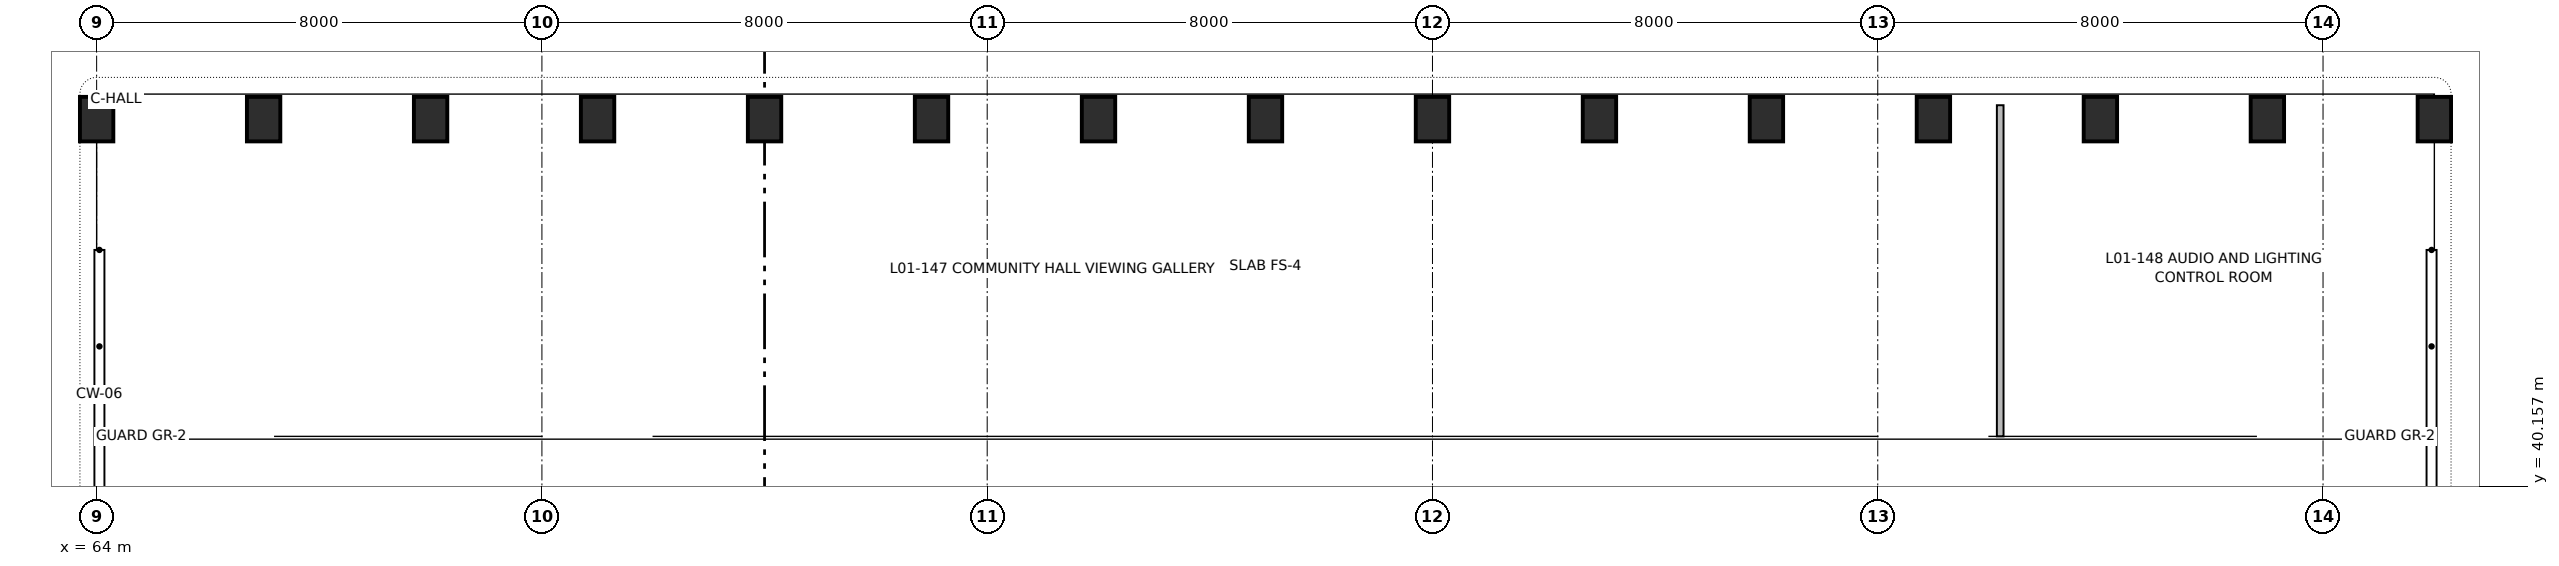
"""IFC4 building model, lengths in metres.
Left out: names, types, materials, properties, quantities, classifications, styles, units other than length and angle.
Written with IfcOpenShell. Run it as: python <this file> out.ifc"""

import sys

from ifc_helpers import new_model, si_unit, direction, frame, frame_2d, origin, origin_2d, place, context, subcontext, project, spatial, rectangle, extrude, element, save


model = new_model("IFC4")
c1 = context("Model", 3, precision=1e-05, world=origin(), true_north=direction((0.0, 1.0)))
c2 = subcontext(c1, "Body", "Model", "MODEL_VIEW")
j1 = project(units=[si_unit("LENGTHUNIT", "METRE"), si_unit("PLANEANGLEUNIT", "RADIAN")], contexts=[c1])
p1 = place(None, origin())
s1 = spatial("IfcSite", under=j1, at=p1, CompositionType="ELEMENT")
p2 = place(p1, origin())
s2 = spatial("IfcBuilding", under=s1, at=p2, CompositionType="ELEMENT")
p3 = place(p2, frame((0.0, 0.0, 4.16)))
s3 = spatial("IfcBuildingStorey", under=s2, at=p3, CompositionType="ELEMENT", Elevation=4.16)
p4 = place(p3, frame((64.0, 46.75, 0.0), z_axis=(0.0, 0.0, 1.0), x_axis=(1.0, 0.0, 0.0)))
e1 = element("IfcColumn", 1, at=p4, inside=s3, PredefinedType="COLUMN", context=c2, shape_type="SweptSolid", body=[
    extrude(rectangle(XDim=0.6, YDim=0.8, at=origin_2d()), origin(), (0.0, 0.0, 1.0), 2.89),
])
p5 = place(p3, frame((67.0, 46.75, 0.0), z_axis=(0.0, 0.0, 1.0), x_axis=(1.0, 0.0, 0.0)))
e2 = element("IfcColumn", 2, at=p5, inside=s3, PredefinedType="COLUMN", context=c2, shape_type="SweptSolid", body=[
    extrude(rectangle(XDim=0.6, YDim=0.8, at=origin_2d()), origin(), (0.0, 0.0, 1.0), 3.8),
])
p6 = place(p3, frame((70.0, 46.75, 0.0), z_axis=(0.0, 0.0, 1.0), x_axis=(1.0, 0.0, 0.0)))
e3 = element("IfcColumn", 3, at=p6, inside=s3, PredefinedType="COLUMN", context=c2, shape_type="SweptSolid", body=[
    extrude(rectangle(XDim=0.6, YDim=0.8, at=origin_2d()), origin(), (0.0, 0.0, 1.0), 2.89),
])
p7 = place(p3, frame((73.0, 46.75, 0.0), z_axis=(0.0, 0.0, 1.0), x_axis=(1.0, 0.0, 0.0)))
e4 = element("IfcColumn", 4, at=p7, inside=s3, PredefinedType="COLUMN", context=c2, shape_type="SweptSolid", body=[
    extrude(rectangle(XDim=0.6, YDim=0.8, at=origin_2d()), origin(), (0.0, 0.0, 1.0), 3.8),
])
p8 = place(p3, frame((76.0, 46.75, 0.0), z_axis=(0.0, 0.0, 1.0), x_axis=(1.0, 0.0, 0.0)))
e5 = element("IfcColumn", 5, at=p8, inside=s3, PredefinedType="COLUMN", context=c2, shape_type="SweptSolid", body=[
    extrude(rectangle(XDim=0.6, YDim=0.8, at=origin_2d()), origin(), (0.0, 0.0, 1.0), 2.89),
])
p9 = place(p3, frame((79.0, 46.75, 0.0), z_axis=(0.0, 0.0, 1.0), x_axis=(1.0, 0.0, 0.0)))
e6 = element("IfcColumn", 6, at=p9, inside=s3, PredefinedType="COLUMN", context=c2, shape_type="SweptSolid", body=[
    extrude(rectangle(XDim=0.6, YDim=0.8, at=origin_2d()), origin(), (0.0, 0.0, 1.0), 3.8),
])
p10 = place(p3, frame((82.0, 46.75, 0.0), z_axis=(0.0, 0.0, 1.0), x_axis=(1.0, 0.0, 0.0)))
e7 = element("IfcColumn", 7, at=p10, inside=s3, PredefinedType="COLUMN", context=c2, shape_type="SweptSolid", body=[
    extrude(rectangle(XDim=0.6, YDim=0.8, at=origin_2d()), origin(), (0.0, 0.0, 1.0), 2.89),
])
p11 = place(p3, frame((85.0, 46.75, 0.0), z_axis=(0.0, 0.0, 1.0), x_axis=(1.0, 0.0, 0.0)))
e8 = element("IfcColumn", 8, at=p11, inside=s3, PredefinedType="COLUMN", context=c2, shape_type="SweptSolid", body=[
    extrude(rectangle(XDim=0.6, YDim=0.8, at=origin_2d()), origin(), (0.0, 0.0, 1.0), 3.8),
])
p12 = place(p3, frame((88.0, 46.75, 0.0), z_axis=(0.0, 0.0, 1.0), x_axis=(1.0, 0.0, 0.0)))
e9 = element("IfcColumn", 9, at=p12, inside=s3, PredefinedType="COLUMN", context=c2, shape_type="SweptSolid", body=[
    extrude(rectangle(XDim=0.6, YDim=0.8, at=origin_2d()), origin(), (0.0, 0.0, 1.0), 2.89),
])
p13 = place(p3, frame((91.0, 46.75, 0.0), z_axis=(0.0, 0.0, 1.0), x_axis=(1.0, 0.0, 0.0)))
e10 = element("IfcColumn", 10, at=p13, inside=s3, PredefinedType="COLUMN", context=c2, shape_type="SweptSolid", body=[
    extrude(rectangle(XDim=0.6, YDim=0.8, at=origin_2d()), origin(), (0.0, 0.0, 1.0), 3.8),
])
p14 = place(p3, frame((94.0, 46.75, 0.0), z_axis=(0.0, 0.0, 1.0), x_axis=(1.0, 0.0, 0.0)))
e11 = element("IfcColumn", 11, at=p14, inside=s3, PredefinedType="COLUMN", context=c2, shape_type="SweptSolid", body=[
    extrude(rectangle(XDim=0.6, YDim=0.8, at=origin_2d()), origin(), (0.0, 0.0, 1.0), 2.89),
])
p15 = place(p3, frame((97.0, 46.75, 0.0), z_axis=(0.0, 0.0, 1.0), x_axis=(1.0, 0.0, 0.0)))
e12 = element("IfcColumn", 12, at=p15, inside=s3, PredefinedType="COLUMN", context=c2, shape_type="SweptSolid", body=[
    extrude(rectangle(XDim=0.6, YDim=0.8, at=origin_2d()), origin(), (0.0, 0.0, 1.0), 3.8),
])
p16 = place(p3, frame((100.0, 46.75, 0.0), z_axis=(0.0, 0.0, 1.0), x_axis=(1.0, 0.0, 0.0)))
e13 = element("IfcColumn", 13, at=p16, inside=s3, PredefinedType="COLUMN", context=c2, shape_type="SweptSolid", body=[
    extrude(rectangle(XDim=0.6, YDim=0.8, at=origin_2d()), origin(), (0.0, 0.0, 1.0), 2.89),
])
p17 = place(p3, frame((103.0, 46.75, 0.0), z_axis=(0.0, 0.0, 1.0), x_axis=(1.0, 0.0, 0.0)))
e14 = element("IfcColumn", 14, at=p17, inside=s3, PredefinedType="COLUMN", context=c2, shape_type="SweptSolid", body=[
    extrude(rectangle(XDim=0.6, YDim=0.8, at=origin_2d()), origin(), (0.0, 0.0, 1.0), 3.8),
])
p18 = place(p3, frame((106.0, 46.75, 0.0), z_axis=(0.0, 0.0, 1.0), x_axis=(1.0, 0.0, 0.0)))
e15 = element("IfcColumn", 15, at=p18, inside=s3, PredefinedType="COLUMN", context=c2, shape_type="SweptSolid", body=[
    extrude(rectangle(XDim=0.6, YDim=0.8, at=origin_2d()), origin(), (0.0, 0.0, 1.0), 2.89),
])
p19 = place(p2, origin())
s4 = spatial("IfcBuildingStorey", under=s2, at=p19, CompositionType="ELEMENT", Elevation=0.0)
p20 = place(p19, frame((64.0, 12.0, 0.0), z_axis=(0.0, 0.0, 1.0), x_axis=(0.0, 1.0, 0.0)))
e16 = element("IfcWall", 16, at=p20, inside=s4, PredefinedType="SHEAR", context=c2, shape_type="SweptSolid", body=[
    extrude(rectangle(XDim=35.2, YDim=0.36, at=frame_2d((17.6, 0.0))), origin(), (0.0, 0.0, 1.0), 6.84),
])
p21 = place(p20, frame((10.0, 0.0, 0.0)))
e17 = element("IfcOpeningElement", 17, at=p21, cuts=e16, PredefinedType="OPENING", context=c2, shape_type="SweptSolid", body=[
    extrude(rectangle(XDim=1.9, YDim=2.3, at=frame_2d((0.95, 1.15))), frame((0.0, 0.19, 0.0), z_axis=(0.0, -1.0, 0.0), x_axis=(1.0, 0.0, 0.0)), (0.0, 0.0, 1.0), 0.38),
])
p22 = place(p20, frame((24.0, 0.0, 0.0)))
e18 = element("IfcOpeningElement", 18, at=p22, cuts=e16, PredefinedType="OPENING", context=c2, shape_type="SweptSolid", body=[
    extrude(rectangle(XDim=1.9, YDim=2.3, at=frame_2d((0.95, 1.15))), frame((0.0, 0.19, 0.0), z_axis=(0.0, -1.0, 0.0), x_axis=(1.0, 0.0, 0.0)), (0.0, 0.0, 1.0), 0.38),
])
p23 = place(p20, frame((30.5, 0.0, 1.1)))
e19 = element("IfcOpeningElement", 19, at=p23, cuts=e16, PredefinedType="OPENING", context=c2, shape_type="SweptSolid", body=[
    extrude(rectangle(XDim=2.2, YDim=1.9, at=frame_2d((1.1, 0.95))), frame((0.0, 0.19, 0.0), z_axis=(0.0, -1.0, 0.0), x_axis=(1.0, 0.0, 0.0)), (0.0, 0.0, 1.0), 0.38),
])
p24 = place(p19, frame((64.0, 47.2, 0.0), z_axis=(0.0, 0.0, 1.0), x_axis=(1.0, 0.0, 0.0)))
e20 = element("IfcWall", 20, at=p24, inside=s4, PredefinedType="SOLIDWALL", context=c2, shape_type="SweptSolid", body=[
    extrude(rectangle(XDim=42.0, YDim=0.4, at=frame_2d((21.0, 0.0))), origin(), (0.0, 0.0, 1.0), 6.84),
])
p25 = place(p24, frame((9.6, 0.0, 0.0)))
e21 = element("IfcOpeningElement", 21, at=p25, cuts=e20, PredefinedType="OPENING", context=c2, shape_type="SweptSolid", body=[
    extrude(rectangle(XDim=1.8, YDim=2.4, at=frame_2d((0.9, 1.2))), frame((0.0, 0.21, 0.0), z_axis=(0.0, -1.0, 0.0), x_axis=(1.0, 0.0, 0.0)), (0.0, 0.0, 1.0), 0.42),
])
p26 = place(p24, frame((21.6, 0.0, 0.0)))
e22 = element("IfcOpeningElement", 22, at=p26, cuts=e20, PredefinedType="OPENING", context=c2, shape_type="SweptSolid", body=[
    extrude(rectangle(XDim=1.8, YDim=2.4, at=frame_2d((0.9, 1.2))), frame((0.0, 0.21, 0.0), z_axis=(0.0, -1.0, 0.0), x_axis=(1.0, 0.0, 0.0)), (0.0, 0.0, 1.0), 0.42),
])
p27 = place(p24, frame((3.0, 0.0, 5.1)))
e23 = element("IfcOpeningElement", 23, at=p27, cuts=e20, PredefinedType="OPENING", context=c2, shape_type="SweptSolid", body=[
    extrude(rectangle(XDim=3.0, YDim=1.1, at=frame_2d((1.5, 0.55))), frame((0.0, 0.21, 0.0), z_axis=(0.0, -1.0, 0.0), x_axis=(1.0, 0.0, 0.0)), (0.0, 0.0, 1.0), 0.42),
])
p28 = place(p24, frame((15.0, 0.0, 5.1)))
e24 = element("IfcOpeningElement", 24, at=p28, cuts=e20, PredefinedType="OPENING", context=c2, shape_type="SweptSolid", body=[
    extrude(rectangle(XDim=3.0, YDim=1.1, at=frame_2d((1.5, 0.55))), frame((0.0, 0.21, 0.0), z_axis=(0.0, -1.0, 0.0), x_axis=(1.0, 0.0, 0.0)), (0.0, 0.0, 1.0), 0.42),
])
p29 = place(p24, frame((37.0, 0.0, 5.1)))
e25 = element("IfcOpeningElement", 25, at=p29, cuts=e20, PredefinedType="OPENING", context=c2, shape_type="SweptSolid", body=[
    extrude(rectangle(XDim=3.0, YDim=1.1, at=frame_2d((1.5, 0.55))), frame((0.0, 0.21, 0.0), z_axis=(0.0, -1.0, 0.0), x_axis=(1.0, 0.0, 0.0)), (0.0, 0.0, 1.0), 0.42),
])
p30 = place(p19, frame((106.0, 47.2, 0.0), z_axis=(0.0, 0.0, 1.0), x_axis=(0.0, -1.0, 0.0)))
e26 = element("IfcWall", 26, at=p30, inside=s4, PredefinedType="SHEAR", context=c2, shape_type="SweptSolid", body=[
    extrude(rectangle(XDim=35.2, YDim=0.36, at=frame_2d((17.6, 0.0))), origin(), (0.0, 0.0, 1.0), 6.84),
])
p31 = place(p30, frame((10.0, 0.0, 0.0)))
e27 = element("IfcOpeningElement", 27, at=p31, cuts=e26, PredefinedType="OPENING", context=c2, shape_type="SweptSolid", body=[
    extrude(rectangle(XDim=1.9, YDim=2.3, at=frame_2d((0.95, 1.15))), frame((0.0, 0.19, 0.0), z_axis=(0.0, -1.0, 0.0), x_axis=(1.0, 0.0, 0.0)), (0.0, 0.0, 1.0), 0.38),
])
p32 = place(p30, frame((24.0, 0.0, 0.0)))
e28 = element("IfcOpeningElement", 28, at=p32, cuts=e26, PredefinedType="OPENING", context=c2, shape_type="SweptSolid", body=[
    extrude(rectangle(XDim=1.9, YDim=2.3, at=frame_2d((0.95, 1.15))), frame((0.0, 0.19, 0.0), z_axis=(0.0, -1.0, 0.0), x_axis=(1.0, 0.0, 0.0)), (0.0, 0.0, 1.0), 0.38),
])
p33 = place(p30, frame((31.0, 0.0, 2.2)))
e29 = element("IfcOpeningElement", 29, at=p33, cuts=e26, PredefinedType="OPENING", context=c2, shape_type="SweptSolid", body=[
    extrude(rectangle(XDim=1.5, YDim=0.75, at=frame_2d((0.75, 0.375))), frame((0.0, 0.19, 0.0), z_axis=(0.0, -1.0, 0.0), x_axis=(1.0, 0.0, 0.0)), (0.0, 0.0, 1.0), 0.38),
])
p34 = place(p3, frame((98.2, 41.05, 0.0), z_axis=(0.0, 0.0, 1.0), x_axis=(0.0, 1.0, 0.0)))
e30 = element("IfcWall", 30, at=p34, inside=s3, PredefinedType="PARTITIONING", context=c2, shape_type="SweptSolid", body=[
    extrude(rectangle(XDim=5.95, YDim=0.12, at=frame_2d((2.975, 0.0))), origin(), (0.0, 0.0, 1.0), 2.16),
])
save(model, sys.argv[1])
